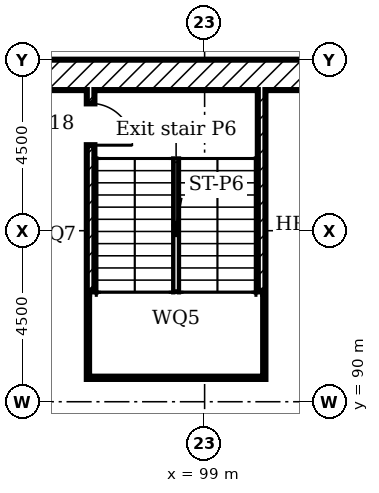
"""IFC4 building model, lengths in metres.
Left out: names, types, materials, properties, quantities, classifications, styles, units other than length and angle.
Written with IfcOpenShell. Run it as: python <this file> out.ifc"""

import sys

from ifc_helpers import new_model, si_unit, direction, frame, frame_2d, origin, place, context, subcontext, project, spatial, rectangle, extrude, element, fill, save


model = new_model("IFC4")
c1 = context("Model", 3, precision=1e-05, world=origin(), true_north=direction((0.0, 1.0)))
c2 = subcontext(c1, "Body", "Model", "MODEL_VIEW")
j1 = project(units=[si_unit("LENGTHUNIT", "METRE"), si_unit("PLANEANGLEUNIT", "RADIAN")], contexts=[c1])
p1 = place(None, origin())
s1 = spatial("IfcSite", under=j1, at=p1, CompositionType="ELEMENT")
p2 = place(p1, origin())
s2 = spatial("IfcBuilding", under=s1, at=p2, CompositionType="ELEMENT")
p3 = place(p2, frame((0.0, 0.0, -4.0)))
s3 = spatial("IfcBuildingStorey", under=s2, at=p3, CompositionType="ELEMENT", Elevation=-4.0)
p4 = place(p3, frame((0.0, 98.6, 0.0)))
e1 = element("IfcWall", 1, at=p4, inside=s3, PredefinedType="SOLIDWALL", context=c2, shape_type="SweptSolid", body=[
    extrude(rectangle(XDim=153.0, YDim=0.8, at=frame_2d((76.5, 0.0))), origin(), (0.0, 0.0, 1.0), 4.0),
])
p5 = place(p3, frame((96.0, 90.6, 0.0), z_axis=(0.0, 0.0, 1.0), x_axis=(0.0, 1.0, 0.0)))
e2 = element("IfcWall", 2, at=p5, inside=s3, PredefinedType="SOLIDWALL", context=c2, shape_type="SweptSolid", body=[
    extrude(rectangle(XDim=7.6, YDim=0.2, at=frame_2d((3.8, 0.0))), origin(), (0.0, 0.0, 1.0), 3.55),
])
p6 = place(p5, frame((6.15, 0.0, 0.0)))
e3 = element("IfcOpeningElement", 3, at=p6, cuts=e2, PredefinedType="OPENING", context=c2, shape_type="SweptSolid", body=[
    extrude(rectangle(XDim=1.1, YDim=2.1, at=frame_2d((0.55, 1.05))), frame((0.0, 0.11, 0.0), z_axis=(0.0, -1.0, 0.0), x_axis=(1.0, 0.0, 0.0)), (0.0, 0.0, 1.0), 0.22),
])
p7 = place(p3, frame((100.5, 90.6, 0.0), z_axis=(0.0, 0.0, 1.0), x_axis=(0.0, 1.0, 0.0)))
e4 = element("IfcWall", 4, at=p7, inside=s3, PredefinedType="SOLIDWALL", context=c2, shape_type="SweptSolid", body=[
    extrude(rectangle(XDim=7.6, YDim=0.2, at=frame_2d((3.8, 0.0))), origin(), (0.0, 0.0, 1.0), 3.55),
])
p8 = place(p3, frame((96.1, 90.7, 0.0)))
e5 = element("IfcWall", 5, at=p8, inside=s3, PredefinedType="SOLIDWALL", context=c2, shape_type="SweptSolid", body=[
    extrude(rectangle(XDim=4.3, YDim=0.2, at=frame_2d((2.15, 0.0))), origin(), (0.0, 0.0, 1.0), 3.55),
])
for number, where, z_axis, x_axis in (
    (6, (100.4, 92.78, -2.0), (0.0, 0.0, 1.0), (-1.0, 0.0, 0.0)),
    (7, (100.4, 91.4, -2.0), (0.0, 0.0, 1.0), (-1.0, 0.0, 0.0)),
):
    element("IfcWall", number, at=place(p3, frame(where, z_axis=z_axis, x_axis=x_axis)), inside=s3, PredefinedType="SOLIDWALL", context=c2, shape_type="SweptSolid", body=[
        extrude(rectangle(XDim=4.3, YDim=0.2, at=frame_2d((2.15, 0.0))), origin(), (0.0, 0.0, 1.0), 3.8),
    ])
p9 = place(p6, frame((1.1, 0.0, 0.0), x_axis=(-1.0, 0.0, 0.0)))
e8 = element("IfcDoor", 8, at=p9, inside=s3, OperationType="SINGLE_SWING_LEFT", PredefinedType="DOOR", context=c2, shape_type="SweptSolid", body=[
    extrude(rectangle(XDim=1.1, YDim=2.1, at=frame_2d((0.55, 1.05))), frame((0.0, 0.025, 0.0), z_axis=(0.0, -1.0, 0.0), x_axis=(1.0, 0.0, 0.0)), (0.0, 0.0, 1.0), 0.05),
])
fill(e3, e8)
save(model, sys.argv[1])
